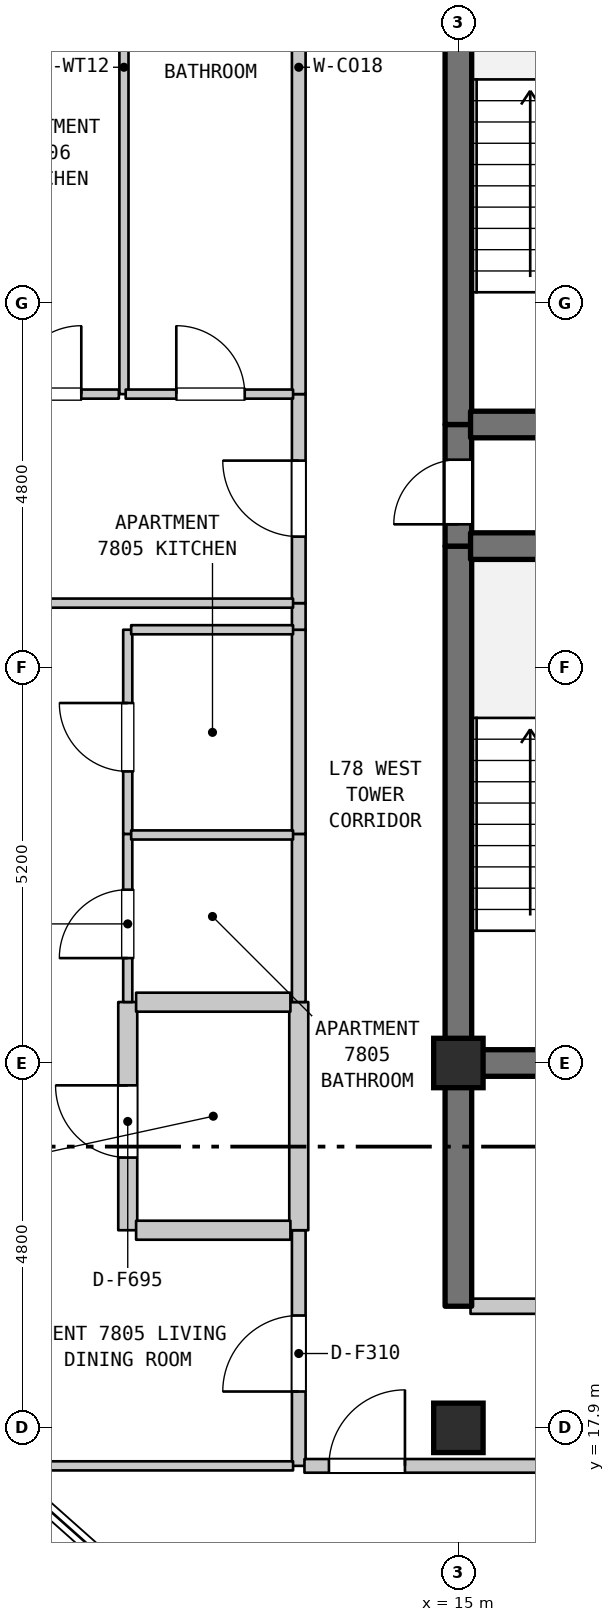
"""IFC4 building model, lengths in metres.
Left out: names, types, materials, properties, quantities, classifications, styles, units other than length and angle.
Written with IfcOpenShell. Run it as: python <this file> out.ifc"""

import sys

from ifc_helpers import new_model, si_unit, direction, frame, frame_2d, origin, origin_2d, place, context, subcontext, project, spatial, rectangle, extrude, element, fill, save


model = new_model("IFC4")
c1 = context("Model", 3, precision=1e-05, world=origin(), true_north=direction((0.0, 1.0)))
c2 = subcontext(c1, "Body", "Model", "MODEL_VIEW")
j1 = project(units=[si_unit("LENGTHUNIT", "METRE"), si_unit("PLANEANGLEUNIT", "RADIAN")], contexts=[c1])
p1 = place(None, origin())
s1 = spatial("IfcSite", under=j1, at=p1, CompositionType="ELEMENT")
p2 = place(p1, origin())
s2 = spatial("IfcBuilding", under=s1, at=p2, CompositionType="ELEMENT")
p3 = place(p2, frame((0.0, 0.0, 311.0)))
s3 = spatial("IfcBuildingStorey", under=s2, at=p3, CompositionType="ELEMENT", Elevation=311.0)
for number, where, z_axis, x_axis in (
    (1, (15.0, 17.9, 0.0), (0.0, 0.0, 1.0), (1.0, 0.0, 0.0)),
    (2, (15.0, 22.7, 0.0), (0.0, 0.0, 1.0), (1.0, 0.0, 0.0)),
):
    element("IfcColumn", number, at=place(p3, frame(where, z_axis=z_axis, x_axis=x_axis)), inside=s3, PredefinedType="COLUMN", context=c2, shape_type="SweptSolid", body=[
        extrude(rectangle(XDim=0.65, YDim=0.65, at=origin_2d()), origin(), (0.0, 0.0, 1.0), 3.7),
    ])
p4 = place(p3, frame((10.6, 31.5, 0.0), z_axis=(0.0, 0.0, 1.0), x_axis=(0.0, 1.0, 0.0)))
e3 = element("IfcWall", 3, at=p4, inside=s3, PredefinedType="PARTITIONING", context=c2, shape_type="SweptSolid", body=[
    extrude(rectangle(XDim=8.6, YDim=0.12, at=frame_2d((4.3, 0.0))), origin(), (0.0, 0.0, 1.0), 3.28),
])
p5 = place(p3, frame((10.65, 20.5, 0.0), z_axis=(0.0, 0.0, 1.0), x_axis=(0.0, 1.0, 0.0)))
e4 = element("IfcWall", 4, at=p5, inside=s3, PredefinedType="STANDARD", context=c2, shape_type="SweptSolid", body=[
    extrude(rectangle(XDim=3.002, YDim=0.25, at=frame_2d((1.501, 0.0))), origin(), (0.0, 0.0, 1.0), 3.28),
])
p6 = place(p5, frame((0.956, 0.0, 0.0)))
e5 = element("IfcOpeningElement", 5, at=p6, cuts=e4, PredefinedType="OPENING", context=c2, shape_type="SweptSolid", body=[
    extrude(rectangle(XDim=0.95, YDim=2.15, at=frame_2d((0.475, 1.075))), frame((0.0, 0.135, 0.0), z_axis=(0.0, -1.0, 0.0), x_axis=(1.0, 0.0, 0.0)), (0.0, 0.0, 1.0), 0.27),
])
p7 = place(p3, frame((10.65, 23.502, 0.0), z_axis=(0.0, 0.0, 1.0), x_axis=(0.0, 1.0, 0.0)))
e6 = element("IfcWall", 6, at=p7, inside=s3, PredefinedType="PARTITIONING", context=c2, shape_type="SweptSolid", body=[
    extrude(rectangle(XDim=2.212, YDim=0.12, at=frame_2d((1.106, 0.0))), origin(), (0.0, 0.0, 1.0), 3.28),
])
p8 = place(p7, frame((0.578, 0.0, 0.0)))
e7 = element("IfcOpeningElement", 7, at=p8, cuts=e6, PredefinedType="OPENING", context=c2, shape_type="SweptSolid", body=[
    extrude(rectangle(XDim=0.9, YDim=2.1, at=frame_2d((0.45, 1.05))), frame((0.0, 0.07, 0.0), z_axis=(0.0, -1.0, 0.0), x_axis=(1.0, 0.0, 0.0)), (0.0, 0.0, 1.0), 0.14),
])
p9 = place(p3, frame((10.65, 25.714, 0.0), z_axis=(0.0, 0.0, 1.0), x_axis=(0.0, 1.0, 0.0)))
e8 = element("IfcWall", 8, at=p9, inside=s3, PredefinedType="PARTITIONING", context=c2, shape_type="SweptSolid", body=[
    extrude(rectangle(XDim=2.686, YDim=0.12, at=frame_2d((1.343, 0.0))), origin(), (0.0, 0.0, 1.0), 3.28),
])
p10 = place(p9, frame((0.822, 0.0, 0.0)))
e9 = element("IfcOpeningElement", 9, at=p10, cuts=e8, PredefinedType="OPENING", context=c2, shape_type="SweptSolid", body=[
    extrude(rectangle(XDim=0.9, YDim=2.15, at=frame_2d((0.45, 1.075))), frame((0.0, 0.07, 0.0), z_axis=(0.0, -1.0, 0.0), x_axis=(1.0, 0.0, 0.0)), (0.0, 0.0, 1.0), 0.14),
])
p11 = place(p3, frame((12.9, 17.4, 0.0), z_axis=(0.0, 0.0, 1.0), x_axis=(0.0, 1.0, 0.0)))
e10 = element("IfcWall", 10, at=p11, inside=s3, PredefinedType="STANDARD", context=c2, shape_type="SweptSolid", body=[
    extrude(rectangle(XDim=3.1, YDim=0.18, at=frame_2d((1.55, 0.0))), origin(), (0.0, 0.0, 1.0), 3.28),
])
p12 = place(p11, frame((0.978, 0.0, 0.0)))
e11 = element("IfcOpeningElement", 11, at=p12, cuts=e10, PredefinedType="OPENING", context=c2, shape_type="SweptSolid", body=[
    extrude(rectangle(XDim=1.0, YDim=2.15, at=frame_2d((0.5, 1.075))), frame((0.0, 0.1, 0.0), z_axis=(0.0, -1.0, 0.0), x_axis=(1.0, 0.0, 0.0)), (0.0, 0.0, 1.0), 0.2),
])
p13 = place(p3, frame((12.9, 20.5, 0.0), z_axis=(0.0, 0.0, 1.0), x_axis=(0.0, 1.0, 0.0)))
e12 = element("IfcWall", 12, at=p13, inside=s3, PredefinedType="STANDARD", context=c2, shape_type="SweptSolid", body=[
    extrude(rectangle(XDim=3.002, YDim=0.25, at=frame_2d((1.501, 0.0))), origin(), (0.0, 0.0, 1.0), 3.28),
])
p14 = place(p3, frame((12.9, 23.502, 0.0), z_axis=(0.0, 0.0, 1.0), x_axis=(0.0, 1.0, 0.0)))
e13 = element("IfcWall", 13, at=p14, inside=s3, PredefinedType="STANDARD", context=c2, shape_type="SweptSolid", body=[
    extrude(rectangle(XDim=2.212, YDim=0.18, at=frame_2d((1.106, 0.0))), origin(), (0.0, 0.0, 1.0), 3.28),
])
p15 = place(p3, frame((12.9, 25.714, 0.0), z_axis=(0.0, 0.0, 1.0), x_axis=(0.0, 1.0, 0.0)))
e14 = element("IfcWall", 14, at=p15, inside=s3, PredefinedType="STANDARD", context=c2, shape_type="SweptSolid", body=[
    extrude(rectangle(XDim=2.686, YDim=0.18, at=frame_2d((1.343, 0.0))), origin(), (0.0, 0.0, 1.0), 3.28),
])
p16 = place(p3, frame((12.9, 28.4, 0.0), z_axis=(0.0, 0.0, 1.0), x_axis=(0.0, 1.0, 0.0)))
e15 = element("IfcWall", 15, at=p16, inside=s3, PredefinedType="STANDARD", context=c2, shape_type="SweptSolid", body=[
    extrude(rectangle(XDim=0.35, YDim=0.18, at=frame_2d((0.175, 0.0))), origin(), (0.0, 0.0, 1.0), 3.28),
])
p17 = place(p3, frame((12.9, 28.75, 0.0), z_axis=(0.0, 0.0, 1.0), x_axis=(0.0, 1.0, 0.0)))
e16 = element("IfcWall", 16, at=p17, inside=s3, PredefinedType="STANDARD", context=c2, shape_type="SweptSolid", body=[
    extrude(rectangle(XDim=2.75, YDim=0.18, at=frame_2d((1.375, 0.0))), origin(), (0.0, 0.0, 1.0), 3.28),
])
p18 = place(p17, frame((0.875, 0.0, 0.0)))
e17 = element("IfcOpeningElement", 17, at=p18, cuts=e16, PredefinedType="OPENING", context=c2, shape_type="SweptSolid", body=[
    extrude(rectangle(XDim=1.0, YDim=2.15, at=frame_2d((0.5, 1.075))), frame((0.0, 0.1, 0.0), z_axis=(0.0, -1.0, 0.0), x_axis=(1.0, 0.0, 0.0)), (0.0, 0.0, 1.0), 0.2),
])
p19 = place(p3, frame((12.9, 31.5, 0.0), z_axis=(0.0, 0.0, 1.0), x_axis=(0.0, 1.0, 0.0)))
e18 = element("IfcWall", 18, at=p19, inside=s3, PredefinedType="STANDARD", context=c2, shape_type="SweptSolid", body=[
    extrude(rectangle(XDim=8.6, YDim=0.18, at=frame_2d((4.3, 0.0))), origin(), (0.0, 0.0, 1.0), 3.28),
])
p20 = place(p3, frame((15.0, 19.5, 0.0), z_axis=(0.0, 0.0, 1.0), x_axis=(0.0, 1.0, 0.0)))
e19 = element("IfcWall", 19, at=p20, inside=s3, PredefinedType="SHEAR", context=c2, shape_type="SweptSolid", body=[
    extrude(rectangle(XDim=3.2, YDim=0.35, at=frame_2d((1.6, 0.0))), origin(), (0.0, 0.0, 1.0), 3.28),
])
p21 = place(p3, frame((15.0, 22.7, 0.0), z_axis=(0.0, 0.0, 1.0), x_axis=(0.0, 1.0, 0.0)))
e20 = element("IfcWall", 20, at=p21, inside=s3, PredefinedType="SHEAR", context=c2, shape_type="SweptSolid", body=[
    extrude(rectangle(XDim=6.8, YDim=0.35, at=frame_2d((3.4, 0.0))), origin(), (0.0, 0.0, 1.0), 3.28),
])
p22 = place(p3, frame((15.0, 29.5, 0.0), z_axis=(0.0, 0.0, 1.0), x_axis=(0.0, 1.0, 0.0)))
e21 = element("IfcWall", 21, at=p22, inside=s3, PredefinedType="SHEAR", context=c2, shape_type="SweptSolid", body=[
    extrude(rectangle(XDim=1.6, YDim=0.35, at=frame_2d((0.8, 0.0))), origin(), (0.0, 0.0, 1.0), 3.28),
])
p23 = place(p22, frame((0.287, 0.0, 0.0)))
e22 = element("IfcOpeningElement", 22, at=p23, cuts=e21, PredefinedType="OPENING", context=c2, shape_type="SweptSolid", body=[
    extrude(rectangle(XDim=0.85, YDim=2.1, at=frame_2d((0.425, 1.05))), frame((0.0, 0.185, 0.0), z_axis=(0.0, -1.0, 0.0), x_axis=(1.0, 0.0, 0.0)), (0.0, 0.0, 1.0), 0.37),
])
p24 = place(p3, frame((15.0, 31.1, 0.0), z_axis=(0.0, 0.0, 1.0), x_axis=(0.0, 1.0, 0.0)))
e23 = element("IfcWall", 23, at=p24, inside=s3, PredefinedType="SHEAR", context=c2, shape_type="SweptSolid", body=[
    extrude(rectangle(XDim=6.8, YDim=0.35, at=frame_2d((3.4, 0.0))), origin(), (0.0, 0.0, 1.0), 3.28),
])
p25 = place(p3, frame((8.973, 17.4, 0.0), z_axis=(0.0, 0.0, 1.0), x_axis=(1.0, 0.0, 0.0)))
e24 = element("IfcWall", 24, at=p25, inside=s3, PredefinedType="PARTITIONING", context=c2, shape_type="SweptSolid", body=[
    extrude(rectangle(XDim=3.852, YDim=0.12, at=frame_2d((1.926, 0.0))), origin(), (0.0, 0.0, 1.0), 3.28),
])
p26 = place(p3, frame((12.975, 17.4, 0.0), z_axis=(0.0, 0.0, 1.0), x_axis=(1.0, 0.0, 0.0)))
e25 = element("IfcWall", 25, at=p26, inside=s3, PredefinedType="STANDARD", context=c2, shape_type="SweptSolid", body=[
    extrude(rectangle(XDim=3.68, YDim=0.18, at=frame_2d((1.84, 0.0))), origin(), (0.0, 0.0, 1.0), 3.28),
])
p27 = place(p26, frame((0.322, 0.0, 0.0)))
e26 = element("IfcOpeningElement", 26, at=p27, cuts=e25, PredefinedType="OPENING", context=c2, shape_type="SweptSolid", body=[
    extrude(rectangle(XDim=1.0, YDim=2.15, at=frame_2d((0.5, 1.075))), frame((0.0, 0.1, 0.0), z_axis=(0.0, -1.0, 0.0), x_axis=(1.0, 0.0, 0.0)), (0.0, 0.0, 1.0), 0.2),
])
p28 = place(p3, frame((15.16, 19.5, 0.0), z_axis=(0.0, 0.0, 1.0), x_axis=(1.0, 0.0, 0.0)))
e27 = element("IfcWall", 27, at=p28, inside=s3, PredefinedType="STANDARD", context=c2, shape_type="SweptSolid", body=[
    extrude(rectangle(XDim=3.68, YDim=0.2, at=frame_2d((1.84, 0.0))), origin(), (0.0, 0.0, 1.0), 3.28),
])
p29 = place(p28, frame((1.39, 0.0, 0.0)))
e28 = element("IfcOpeningElement", 28, at=p29, cuts=e27, PredefinedType="OPENING", context=c2, shape_type="SweptSolid", body=[
    extrude(rectangle(XDim=0.9, YDim=2.15, at=frame_2d((0.45, 1.075))), frame((0.0, 0.11, 0.0), z_axis=(0.0, -1.0, 0.0), x_axis=(1.0, 0.0, 0.0)), (0.0, 0.0, 1.0), 0.22),
])
p30 = place(p3, frame((10.76, 20.5, 0.0), z_axis=(0.0, 0.0, 1.0), x_axis=(1.0, 0.0, 0.0)))
e29 = element("IfcWall", 29, at=p30, inside=s3, PredefinedType="STANDARD", context=c2, shape_type="SweptSolid", body=[
    extrude(rectangle(XDim=2.03, YDim=0.25, at=frame_2d((1.015, 0.0))), origin(), (0.0, 0.0, 1.0), 3.28),
])
p31 = place(p3, frame((15.16, 22.7, 0.0), z_axis=(0.0, 0.0, 1.0), x_axis=(1.0, 0.0, 0.0)))
e30 = element("IfcWall", 30, at=p31, inside=s3, PredefinedType="SHEAR", context=c2, shape_type="SweptSolid", body=[
    extrude(rectangle(XDim=3.68, YDim=0.35, at=frame_2d((1.84, 0.0))), origin(), (0.0, 0.0, 1.0), 3.28),
])
p32 = place(p3, frame((10.76, 23.5, 0.0), z_axis=(0.0, 0.0, 1.0), x_axis=(1.0, 0.0, 0.0)))
e31 = element("IfcWall", 31, at=p32, inside=s3, PredefinedType="STANDARD", context=c2, shape_type="SweptSolid", body=[
    extrude(rectangle(XDim=2.03, YDim=0.25, at=frame_2d((1.015, 0.0))), origin(), (0.0, 0.0, 1.0), 3.28),
])
for number, where, z_axis, x_axis in (
    (32, (10.695, 25.7, 0.0), (0.0, 0.0, 1.0), (1.0, 0.0, 0.0)),
    (33, (10.695, 28.4, 0.0), (0.0, 0.0, 1.0), (1.0, 0.0, 0.0)),
):
    element("IfcWall", number, at=place(p3, frame(where, z_axis=z_axis, x_axis=x_axis)), inside=s3, PredefinedType="PARTITIONING", context=c2, shape_type="SweptSolid", body=[
        extrude(rectangle(XDim=2.13, YDim=0.12, at=frame_2d((1.065, 0.0))), origin(), (0.0, 0.0, 1.0), 3.28),
    ])
p33 = place(p3, frame((9.175, 28.75, 0.0), z_axis=(0.0, 0.0, 1.0), x_axis=(1.0, 0.0, 0.0)))
e34 = element("IfcWall", 34, at=p33, inside=s3, PredefinedType="PARTITIONING", context=c2, shape_type="SweptSolid", body=[
    extrude(rectangle(XDim=3.65, YDim=0.12, at=frame_2d((1.825, 0.0))), origin(), (0.0, 0.0, 1.0), 3.28),
])
for number, where, z_axis, x_axis in (
    (35, (15.16, 29.5, 0.0), (0.0, 0.0, 1.0), (1.0, 0.0, 0.0)),
    (36, (15.16, 31.1, 0.0), (0.0, 0.0, 1.0), (1.0, 0.0, 0.0)),
):
    element("IfcWall", number, at=place(p3, frame(where, z_axis=z_axis, x_axis=x_axis)), inside=s3, PredefinedType="SHEAR", context=c2, shape_type="SweptSolid", body=[
        extrude(rectangle(XDim=3.68, YDim=0.35, at=frame_2d((1.84, 0.0))), origin(), (0.0, 0.0, 1.0), 3.28),
    ])
p34 = place(p3, frame((8.645, 31.5, 0.0), z_axis=(0.0, 0.0, 1.0), x_axis=(1.0, 0.0, 0.0)))
e37 = element("IfcWall", 37, at=p34, inside=s3, PredefinedType="PARTITIONING", context=c2, shape_type="SweptSolid", body=[
    extrude(rectangle(XDim=1.888, YDim=0.12, at=frame_2d((0.944, 0.0))), origin(), (0.0, 0.0, 1.0), 3.28),
])
p35 = place(p34, frame((0.494, 0.0, 0.0)))
e38 = element("IfcOpeningElement", 38, at=p35, cuts=e37, PredefinedType="OPENING", context=c2, shape_type="SweptSolid", body=[
    extrude(rectangle(XDim=0.9, YDim=2.15, at=frame_2d((0.45, 1.075))), frame((0.0, 0.07, 0.0), z_axis=(0.0, -1.0, 0.0), x_axis=(1.0, 0.0, 0.0)), (0.0, 0.0, 1.0), 0.14),
])
p36 = place(p3, frame((10.623, 31.5, 0.0), z_axis=(0.0, 0.0, 1.0), x_axis=(1.0, 0.0, 0.0)))
e39 = element("IfcWall", 39, at=p36, inside=s3, PredefinedType="PARTITIONING", context=c2, shape_type="SweptSolid", body=[
    extrude(rectangle(XDim=2.202, YDim=0.12, at=frame_2d((1.101, 0.0))), origin(), (0.0, 0.0, 1.0), 3.28),
])
p37 = place(p36, frame((0.666, 0.0, 0.0)))
e40 = element("IfcOpeningElement", 40, at=p37, cuts=e39, PredefinedType="OPENING", context=c2, shape_type="SweptSolid", body=[
    extrude(rectangle(XDim=0.9, YDim=2.1, at=frame_2d((0.45, 1.05))), frame((0.0, 0.07, 0.0), z_axis=(0.0, -1.0, 0.0), x_axis=(1.0, 0.0, 0.0)), (0.0, 0.0, 1.0), 0.14),
])
p38 = place(p6, origin())
e41 = element("IfcDoor", 41, at=p38, inside=s3, OperationType="SINGLE_SWING_RIGHT", PredefinedType="DOOR", context=c2, shape_type="SweptSolid", body=[
    extrude(rectangle(XDim=0.95, YDim=2.15, at=frame_2d((0.475, 1.075))), frame((0.0, 0.025, 0.0), z_axis=(0.0, -1.0, 0.0), x_axis=(1.0, 0.0, 0.0)), (0.0, 0.0, 1.0), 0.05),
])
fill(e5, e41)
p39 = place(p8, origin())
e42 = element("IfcDoor", 42, at=p39, inside=s3, OperationType="SINGLE_SWING_LEFT", PredefinedType="DOOR", context=c2, shape_type="SweptSolid", body=[
    extrude(rectangle(XDim=0.9, YDim=2.1, at=frame_2d((0.45, 1.05))), frame((0.0, 0.025, 0.0), z_axis=(0.0, -1.0, 0.0), x_axis=(1.0, 0.0, 0.0)), (0.0, 0.0, 1.0), 0.05),
])
fill(e7, e42)
p40 = place(p10, origin())
e43 = element("IfcDoor", 43, at=p40, inside=s3, OperationType="SINGLE_SWING_RIGHT", PredefinedType="DOOR", context=c2, shape_type="SweptSolid", body=[
    extrude(rectangle(XDim=0.9, YDim=2.15, at=frame_2d((0.45, 1.075))), frame((0.0, 0.025, 0.0), z_axis=(0.0, -1.0, 0.0), x_axis=(1.0, 0.0, 0.0)), (0.0, 0.0, 1.0), 0.05),
])
fill(e9, e43)
p41 = place(p12, origin())
e44 = element("IfcDoor", 44, at=p41, inside=s3, OperationType="SINGLE_SWING_LEFT", PredefinedType="DOOR", context=c2, shape_type="SweptSolid", body=[
    extrude(rectangle(XDim=1.0, YDim=2.15, at=frame_2d((0.5, 1.075))), frame((0.0, 0.025, 0.0), z_axis=(0.0, -1.0, 0.0), x_axis=(1.0, 0.0, 0.0)), (0.0, 0.0, 1.0), 0.05),
])
fill(e11, e44)
p42 = place(p18, origin())
e45 = element("IfcDoor", 45, at=p42, inside=s3, OperationType="SINGLE_SWING_RIGHT", PredefinedType="DOOR", context=c2, shape_type="SweptSolid", body=[
    extrude(rectangle(XDim=1.0, YDim=2.15, at=frame_2d((0.5, 1.075))), frame((0.0, 0.025, 0.0), z_axis=(0.0, -1.0, 0.0), x_axis=(1.0, 0.0, 0.0)), (0.0, 0.0, 1.0), 0.05),
])
fill(e17, e45)
p43 = place(p23, origin())
e46 = element("IfcDoor", 46, at=p43, inside=s3, OperationType="SINGLE_SWING_LEFT", PredefinedType="DOOR", context=c2, shape_type="SweptSolid", body=[
    extrude(rectangle(XDim=0.85, YDim=2.1, at=frame_2d((0.425, 1.05))), frame((0.0, 0.025, 0.0), z_axis=(0.0, -1.0, 0.0), x_axis=(1.0, 0.0, 0.0)), (0.0, 0.0, 1.0), 0.05),
])
fill(e22, e46)
p44 = place(p27, origin())
e47 = element("IfcDoor", 47, at=p44, inside=s3, OperationType="SINGLE_SWING_RIGHT", PredefinedType="DOOR", context=c2, shape_type="SweptSolid", body=[
    extrude(rectangle(XDim=1.0, YDim=2.15, at=frame_2d((0.5, 1.075))), frame((0.0, 0.025, 0.0), z_axis=(0.0, -1.0, 0.0), x_axis=(1.0, 0.0, 0.0)), (0.0, 0.0, 1.0), 0.05),
])
fill(e26, e47)
p45 = place(p35, origin())
e48 = element("IfcDoor", 48, at=p45, inside=s3, OperationType="SINGLE_SWING_RIGHT", PredefinedType="DOOR", context=c2, shape_type="SweptSolid", body=[
    extrude(rectangle(XDim=0.9, YDim=2.15, at=frame_2d((0.45, 1.075))), frame((0.0, 0.025, 0.0), z_axis=(0.0, -1.0, 0.0), x_axis=(1.0, 0.0, 0.0)), (0.0, 0.0, 1.0), 0.05),
])
fill(e38, e48)
p46 = place(p37, origin())
e49 = element("IfcDoor", 49, at=p46, inside=s3, OperationType="SINGLE_SWING_LEFT", PredefinedType="DOOR", context=c2, shape_type="SweptSolid", body=[
    extrude(rectangle(XDim=0.9, YDim=2.1, at=frame_2d((0.45, 1.05))), frame((0.0, 0.025, 0.0), z_axis=(0.0, -1.0, 0.0), x_axis=(1.0, 0.0, 0.0)), (0.0, 0.0, 1.0), 0.05),
])
fill(e40, e49)
save(model, sys.argv[1])
